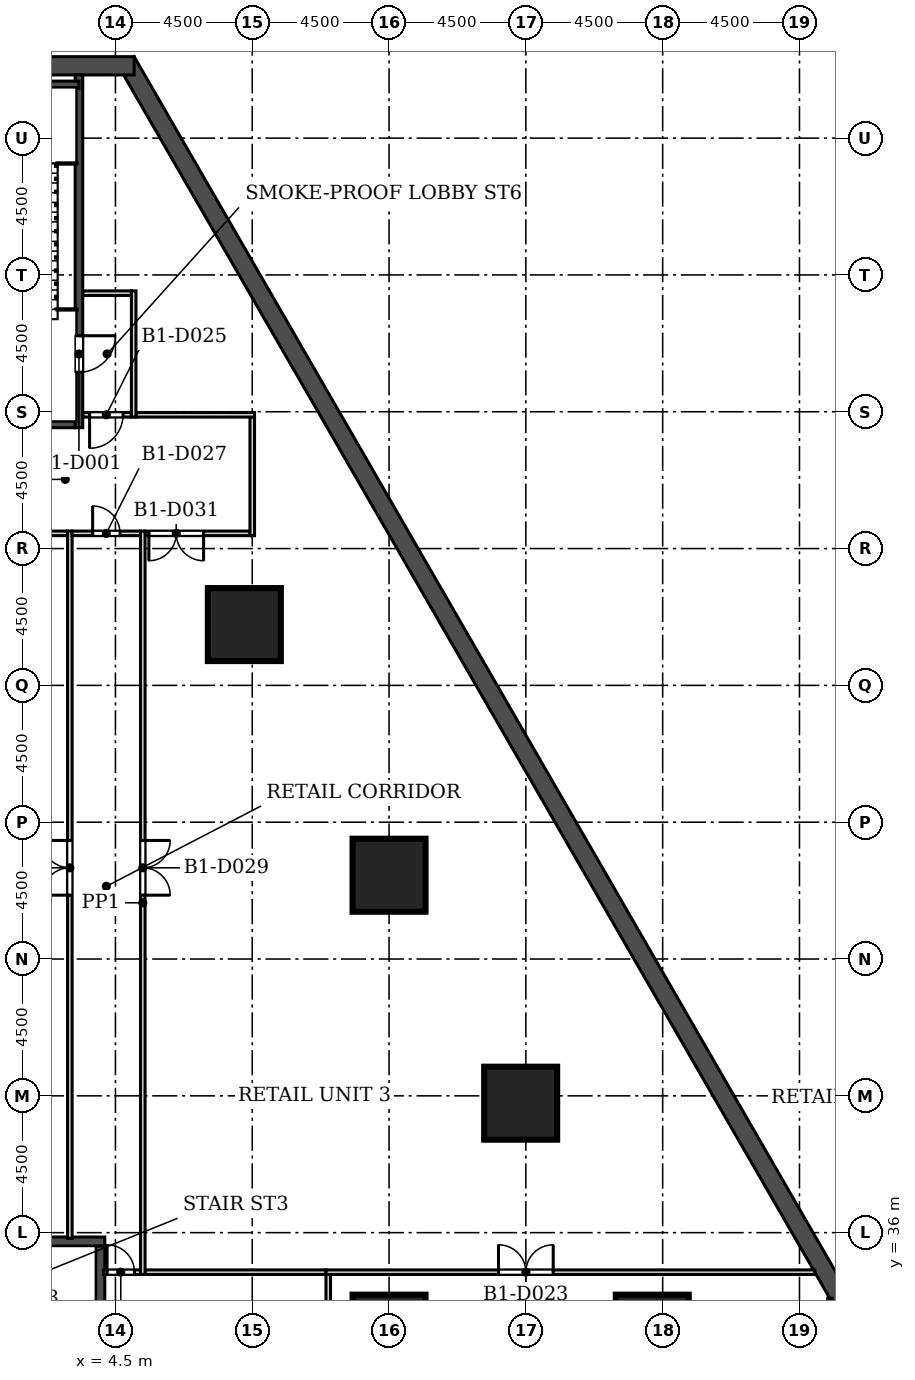
"""IFC4 building model, lengths in metres.
Left out: names, types, materials, properties, quantities, classifications, styles, units other than length and angle.
Written with IfcOpenShell. Run it as: python <this file> out.ifc"""

import sys

from ifc_helpers import new_model, si_unit, direction, frame, frame_2d, origin, origin_2d, place, context, subcontext, project, spatial, rectangle, extrude, element, fill, save


model = new_model("IFC4")
c1 = context("Model", 3, precision=1e-05, world=origin(), true_north=direction((0.0, 1.0)))
c2 = subcontext(c1, "Body", "Model", "MODEL_VIEW")
j1 = project(units=[si_unit("LENGTHUNIT", "METRE"), si_unit("PLANEANGLEUNIT", "RADIAN")], contexts=[c1])
p1 = place(None, origin())
s1 = spatial("IfcSite", under=j1, at=p1, CompositionType="ELEMENT")
p2 = place(p1, origin())
s2 = spatial("IfcBuilding", under=s1, at=p2, CompositionType="ELEMENT")
p3 = place(p2, frame((0.0, 0.0, -8.0)))
s3 = spatial("IfcBuildingStorey", under=s2, at=p3, CompositionType="ELEMENT", Elevation=-8.0)
p4 = place(p3, frame((42.971, 8.51, 0.0), z_axis=(0.0, 0.0, 1.0), x_axis=(-0.499999312333, 0.866025800809, 0.0)))
e1 = element("IfcWall", 1, at=p4, inside=s3, PredefinedType="SOLIDWALL", context=c2, shape_type="SweptSolid", body=[
    extrude(rectangle(XDim=76.231, YDim=0.6, at=frame_2d((38.115, 0.0))), origin(), (0.0, 0.0, 1.0), 7.6),
])
p5 = place(p3, frame((5.115, 74.378, 0.0), z_axis=(0.0, 0.0, 1.0), x_axis=(-1.0, 0.0, 0.0)))
e2 = element("IfcWall", 2, at=p5, inside=s3, PredefinedType="SOLIDWALL", context=c2, shape_type="SweptSolid", body=[
    extrude(rectangle(XDim=10.231, YDim=0.6, at=frame_2d((5.115, 0.0))), origin(), (0.0, 0.0, 1.0), 7.6),
])
for number, where, z_axis, x_axis in (
    (3, (8.74, 56.0, 0.0), (0.0, 0.0, 1.0), (1.0, 0.0, 0.0)),
    (4, (22.158, 32.76, 0.0), (0.0, 0.0, 1.0), (1.0, 0.0, 0.0)),
    (5, (13.5, 47.756, 0.0), (0.0, 0.0, 1.0), (1.0, 0.0, 0.0)),
    (6, (13.5, 32.76, 0.0), (0.0, 0.0, 1.0), (1.0, 0.0, 0.0)),
    (7, (17.829, 40.258, 0.0), (0.0, 0.0, 1.0), (1.0, 0.0, 0.0)),
):
    element("IfcColumn", number, at=place(p3, frame(where, z_axis=z_axis, x_axis=x_axis)), inside=s3, PredefinedType="COLUMN", context=c2, shape_type="SweptSolid", body=[
        extrude(rectangle(XDim=2.4, YDim=2.4, at=origin_2d()), origin(), (0.0, 0.0, 1.0), 8.0),
    ])
p6 = place(p3, frame((-4.15, 35.707, -0.35), z_axis=(0.0, 0.0, 1.0), x_axis=(1.0, 0.0, 0.0)))
e8 = element("IfcWall", 8, at=p6, inside=s3, PredefinedType="SOLIDWALL", context=c2, shape_type="SweptSolid", body=[
    extrude(rectangle(XDim=8.3, YDim=0.3, at=frame_2d((4.15, 0.0))), origin(), (0.0, 0.0, 1.0), 7.95),
])
p7 = place(p3, frame((4.0, 29.057, -0.35), z_axis=(0.0, 0.0, 1.0), x_axis=(0.0, 1.0, 0.0)))
e9 = element("IfcWall", 9, at=p7, inside=s3, PredefinedType="SOLIDWALL", context=c2, shape_type="SweptSolid", body=[
    extrude(rectangle(XDim=6.5, YDim=0.3, at=frame_2d((3.25, 0.0))), origin(), (0.0, 0.0, 1.0), 7.95),
])
p8 = place(p3, frame((28.0, 29.525, 0.0), z_axis=(0.0, 0.0, 1.0), x_axis=(0.0, 1.0, 0.0)))
e10 = element("IfcWall", 10, at=p8, inside=s3, PredefinedType="PARTITIONING", context=c2, shape_type="SweptSolid", body=[
    extrude(rectangle(XDim=4.316, YDim=0.15, at=frame_2d((2.158, 0.0))), origin(), (0.0, 0.0, 1.0), 7.6),
])
p9 = place(p3, frame((11.5, 34.625, 0.0), z_axis=(0.0, 0.0, 1.0), x_axis=(0.0, -1.0, 0.0)))
e11 = element("IfcWall", 11, at=p9, inside=s3, PredefinedType="PARTITIONING", context=c2, shape_type="SweptSolid", body=[
    extrude(rectangle(XDim=8.7, YDim=0.15, at=frame_2d((4.35, 0.0))), origin(), (0.0, 0.0, 1.0), 7.6),
])
p10 = place(p9, frame((5.125, 0.0, 0.0)))
e12 = element("IfcOpeningElement", 12, at=p10, cuts=e11, PredefinedType="OPENING", context=c2, shape_type="SweptSolid", body=[
    extrude(rectangle(XDim=3.0, YDim=2.4, at=frame_2d((1.5, 1.2))), frame((0.0, 0.085, 0.0), z_axis=(0.0, -1.0, 0.0), x_axis=(1.0, 0.0, 0.0)), (0.0, 0.0, 1.0), 0.17),
])
p11 = place(p3, frame((5.325, 34.7, 0.0), z_axis=(0.0, 0.0, 1.0), x_axis=(-1.0, 0.0, 0.0)))
e13 = element("IfcWall", 13, at=p11, inside=s3, PredefinedType="PARTITIONING", context=c2, shape_type="SweptSolid", body=[
    extrude(rectangle(XDim=1.22, YDim=0.15, at=frame_2d((0.61, 0.0))), origin(), (0.0, 0.0, 1.0), 7.6),
])
p12 = place(p11, frame((0.2, 0.0, 0.0)))
e14 = element("IfcOpeningElement", 14, at=p12, cuts=e13, PredefinedType="OPENING", context=c2, shape_type="SweptSolid", body=[
    extrude(rectangle(XDim=0.9, YDim=2.1, at=frame_2d((0.45, 1.05))), frame((0.0, 0.085, 0.0), z_axis=(0.0, -1.0, 0.0), x_axis=(1.0, 0.0, 0.0)), (0.0, 0.0, 1.0), 0.17),
])
p13 = place(p3, frame((11.425, 34.7, 0.0), z_axis=(0.0, 0.0, 1.0), x_axis=(-1.0, 0.0, 0.0)))
e15 = element("IfcWall", 15, at=p13, inside=s3, PredefinedType="PARTITIONING", context=c2, shape_type="SweptSolid", body=[
    extrude(rectangle(XDim=5.95, YDim=0.15, at=frame_2d((2.975, 0.0))), origin(), (0.0, 0.0, 1.0), 7.6),
])
p14 = place(p3, frame((27.504, 34.7, 0.0), z_axis=(0.0, 0.0, 1.0), x_axis=(-1.0, 0.0, 0.0)))
e16 = element("IfcWall", 16, at=p14, inside=s3, PredefinedType="PARTITIONING", context=c2, shape_type="SweptSolid", body=[
    extrude(rectangle(XDim=16.079, YDim=0.15, at=frame_2d((8.04, 0.0))), origin(), (0.0, 0.0, 1.0), 7.6),
])
p15 = place(p14, frame((8.604, 0.0, 0.0)))
e17 = element("IfcOpeningElement", 17, at=p15, cuts=e16, PredefinedType="OPENING", context=c2, shape_type="SweptSolid", body=[
    extrude(rectangle(XDim=1.8, YDim=2.1, at=frame_2d((0.9, 1.05))), frame((0.0, 0.085, 0.0), z_axis=(0.0, -1.0, 0.0), x_axis=(1.0, 0.0, 0.0)), (0.0, 0.0, 1.0), 0.17),
])
p16 = place(p3, frame((3.0, 35.812, 0.0), z_axis=(0.0, 0.0, 1.0), x_axis=(0.0, 1.0, 0.0)))
e18 = element("IfcWall", 18, at=p16, inside=s3, PredefinedType="PARTITIONING", context=c2, shape_type="SweptSolid", body=[
    extrude(rectangle(XDim=23.263, YDim=0.15, at=frame_2d((11.631, 0.0))), origin(), (0.0, 0.0, 1.0), 7.6),
])
p17 = place(p16, frame((11.288, 0.0, 0.0)))
e19 = element("IfcOpeningElement", 19, at=p17, cuts=e18, PredefinedType="OPENING", context=c2, shape_type="SweptSolid", body=[
    extrude(rectangle(XDim=1.8, YDim=2.1, at=frame_2d((0.9, 1.05))), frame((0.0, 0.085, 0.0), z_axis=(0.0, -1.0, 0.0), x_axis=(1.0, 0.0, 0.0)), (0.0, 0.0, 1.0), 0.17),
])
p18 = place(p3, frame((2.925, 59.0, 0.0), z_axis=(0.0, 0.0, 1.0), x_axis=(-1.0, 0.0, 0.0)))
e20 = element("IfcWall", 20, at=p18, inside=s3, PredefinedType="PARTITIONING", context=c2, shape_type="SweptSolid", body=[
    extrude(rectangle(XDim=6.3, YDim=0.15, at=frame_2d((3.15, 0.0))), origin(), (0.0, 0.0, 1.0), 7.6),
])
p19 = place(p18, frame((3.625, 0.0, 0.0)))
e21 = element("IfcOpeningElement", 21, at=p19, cuts=e20, PredefinedType="OPENING", context=c2, shape_type="SweptSolid", body=[
    extrude(rectangle(XDim=1.8, YDim=2.1, at=frame_2d((0.9, 1.05))), frame((0.0, 0.085, 0.0), z_axis=(0.0, -1.0, 0.0), x_axis=(1.0, 0.0, 0.0)), (0.0, 0.0, 1.0), 0.17),
])
p20 = place(p3, frame((5.325, 59.0, 0.0), z_axis=(0.0, 0.0, 1.0), x_axis=(-1.0, 0.0, 0.0)))
e22 = element("IfcWall", 22, at=p20, inside=s3, PredefinedType="PARTITIONING", context=c2, shape_type="SweptSolid", body=[
    extrude(rectangle(XDim=2.25, YDim=0.15, at=frame_2d((1.125, 0.0))), origin(), (0.0, 0.0, 1.0), 7.6),
])
p21 = place(p20, frame((0.675, 0.0, 0.0)))
e23 = element("IfcOpeningElement", 23, at=p21, cuts=e22, PredefinedType="OPENING", context=c2, shape_type="SweptSolid", body=[
    extrude(rectangle(XDim=0.9, YDim=2.1, at=frame_2d((0.45, 1.05))), frame((0.0, 0.085, 0.0), z_axis=(0.0, -1.0, 0.0), x_axis=(1.0, 0.0, 0.0)), (0.0, 0.0, 1.0), 0.17),
])
p22 = place(p3, frame((8.925, 59.0, 0.0), z_axis=(0.0, 0.0, 1.0), x_axis=(-1.0, 0.0, 0.0)))
e24 = element("IfcWall", 24, at=p22, inside=s3, PredefinedType="PARTITIONING", context=c2, shape_type="SweptSolid", body=[
    extrude(rectangle(XDim=3.45, YDim=0.15, at=frame_2d((1.725, 0.0))), origin(), (0.0, 0.0, 1.0), 7.6),
])
p23 = place(p22, frame((1.525, 0.0, 0.0)))
e25 = element("IfcOpeningElement", 25, at=p23, cuts=e24, PredefinedType="OPENING", context=c2, shape_type="SweptSolid", body=[
    extrude(rectangle(XDim=1.8, YDim=2.1, at=frame_2d((0.9, 1.05))), frame((0.0, 0.085, 0.0), z_axis=(0.0, -1.0, 0.0), x_axis=(1.0, 0.0, 0.0)), (0.0, 0.0, 1.0), 0.17),
])
p24 = place(p3, frame((5.4, 59.075, 0.0), z_axis=(0.0, 0.0, 1.0), x_axis=(0.0, -1.0, 0.0)))
e26 = element("IfcWall", 26, at=p24, inside=s3, PredefinedType="PARTITIONING", context=c2, shape_type="SweptSolid", body=[
    extrude(rectangle(XDim=24.45, YDim=0.15, at=frame_2d((12.225, 0.0))), origin(), (0.0, 0.0, 1.0), 7.6),
])
p25 = place(p24, frame((10.175, 0.0, 0.0)))
e27 = element("IfcOpeningElement", 27, at=p25, cuts=e26, PredefinedType="OPENING", context=c2, shape_type="SweptSolid", body=[
    extrude(rectangle(XDim=1.8, YDim=2.1, at=frame_2d((0.9, 1.05))), frame((0.0, 0.085, 0.0), z_axis=(0.0, -1.0, 0.0), x_axis=(1.0, 0.0, 0.0)), (0.0, 0.0, 1.0), 0.17),
])
p26 = place(p3, frame((3.175, 62.6, 0.0), z_axis=(0.0, 0.0, 1.0), x_axis=(-1.0, 0.0, 0.0)))
e28 = element("IfcWall", 28, at=p26, inside=s3, PredefinedType="SOLIDWALL", context=c2, shape_type="SweptSolid", body=[
    extrude(rectangle(XDim=6.35, YDim=0.25, at=frame_2d((3.175, 0.0))), origin(), (0.0, 0.0, 1.0), 7.6),
])
p27 = place(p3, frame((9.0, 62.825, 0.0), z_axis=(0.0, 0.0, 1.0), x_axis=(0.0, -1.0, 0.0)))
e29 = element("IfcWall", 29, at=p27, inside=s3, PredefinedType="PARTITIONING", context=c2, shape_type="SweptSolid", body=[
    extrude(rectangle(XDim=3.9, YDim=0.15, at=frame_2d((1.95, 0.0))), origin(), (0.0, 0.0, 1.0), 7.6),
])
p28 = place(p3, frame((5.025, 62.9, 0.0), z_axis=(0.0, 0.0, 1.0), x_axis=(-1.0, 0.0, 0.0)))
e30 = element("IfcWall", 30, at=p28, inside=s3, PredefinedType="PARTITIONING", context=c2, shape_type="SweptSolid", body=[
    extrude(rectangle(XDim=1.6, YDim=0.15, at=frame_2d((0.8, 0.0))), origin(), (0.0, 0.0, 1.0), 7.6),
])
p29 = place(p28, frame((0.275, 0.0, 0.0)))
e31 = element("IfcOpeningElement", 31, at=p29, cuts=e30, PredefinedType="OPENING", context=c2, shape_type="SweptSolid", body=[
    extrude(rectangle(XDim=1.1, YDim=2.1, at=frame_2d((0.55, 1.05))), frame((0.0, 0.085, 0.0), z_axis=(0.0, -1.0, 0.0), x_axis=(1.0, 0.0, 0.0)), (0.0, 0.0, 1.0), 0.17),
])
p30 = place(p3, frame((5.175, 62.9, 0.0), z_axis=(0.0, 0.0, 1.0), x_axis=(1.0, 0.0, 0.0)))
e32 = element("IfcWall", 32, at=p30, inside=s3, PredefinedType="PARTITIONING", context=c2, shape_type="SweptSolid", body=[
    extrude(rectangle(XDim=3.9, YDim=0.15, at=frame_2d((1.95, 0.0))), origin(), (0.0, 0.0, 1.0), 7.6),
])
p31 = place(p3, frame((3.425, 66.9, 0.0), z_axis=(0.0, 0.0, 1.0), x_axis=(1.0, 0.0, 0.0)))
e33 = element("IfcWall", 33, at=p31, inside=s3, PredefinedType="PARTITIONING", context=c2, shape_type="SweptSolid", body=[
    extrude(rectangle(XDim=1.6, YDim=0.15, at=frame_2d((0.8, 0.0))), origin(), (0.0, 0.0, 1.0), 7.6),
])
p32 = place(p3, frame((5.1, 66.975, 0.0), z_axis=(0.0, 0.0, 1.0), x_axis=(0.0, -1.0, 0.0)))
e34 = element("IfcWall", 34, at=p32, inside=s3, PredefinedType="PARTITIONING", context=c2, shape_type="SweptSolid", body=[
    extrude(rectangle(XDim=4.15, YDim=0.15, at=frame_2d((2.075, 0.0))), origin(), (0.0, 0.0, 1.0), 7.6),
])
p33 = place(p3, frame((3.3, 74.078, 0.0), z_axis=(0.0, 0.0, 1.0), x_axis=(0.0, -1.0, 0.0)))
e35 = element("IfcWall", 35, at=p33, inside=s3, PredefinedType="SOLIDWALL", context=c2, shape_type="SweptSolid", body=[
    extrude(rectangle(XDim=11.603, YDim=0.25, at=frame_2d((5.802, 0.0))), origin(), (0.0, 0.0, 1.0), 7.6),
])
p34 = place(p33, frame((8.578, 0.0, 0.0)))
e36 = element("IfcOpeningElement", 36, at=p34, cuts=e35, PredefinedType="OPENING", context=c2, shape_type="SweptSolid", body=[
    extrude(rectangle(XDim=1.2, YDim=2.1, at=frame_2d((0.6, 1.05))), frame((0.0, 0.135, 0.0), z_axis=(0.0, -1.0, 0.0), x_axis=(1.0, 0.0, 0.0)), (0.0, 0.0, 1.0), 0.27),
])
p35 = place(p3, frame((-3.3, 73.75, 0.0), z_axis=(0.0, 0.0, 1.0), x_axis=(1.0, 0.0, 0.0)))
e37 = element("IfcWall", 37, at=p35, inside=s3, PredefinedType="SOLIDWALL", context=c2, shape_type="SweptSolid", body=[
    extrude(rectangle(XDim=6.6, YDim=0.25, at=frame_2d((3.3, 0.0))), origin(), (0.0, 0.0, 1.0), 7.6),
])
p36 = place(p34, origin())
e38 = element("IfcDoor", 38, at=p36, inside=s3, OperationType="SINGLE_SWING_LEFT", PredefinedType="DOOR", context=c2, shape_type="SweptSolid", body=[
    extrude(rectangle(XDim=1.2, YDim=2.1, at=frame_2d((0.6, 1.05))), frame((0.0, 0.025, 0.0), z_axis=(0.0, -1.0, 0.0), x_axis=(1.0, 0.0, 0.0)), (0.0, 0.0, 1.0), 0.05),
])
fill(e36, e38)
p37 = place(p15, frame((1.8, 0.0, 0.0), z_axis=(0.0, 0.0, 1.0), x_axis=(-1.0, 0.0, 0.0)))
e39 = element("IfcDoor", 39, at=p37, inside=s3, OperationType="DOUBLE_DOOR_SINGLE_SWING", PredefinedType="DOOR", context=c2, shape_type="SweptSolid", body=[
    extrude(rectangle(XDim=1.8, YDim=2.1, at=frame_2d((0.9, 1.05))), frame((0.0, 0.025, 0.0), z_axis=(0.0, -1.0, 0.0), x_axis=(1.0, 0.0, 0.0)), (0.0, 0.0, 1.0), 0.05),
])
fill(e17, e39)
p38 = place(p29, origin())
e40 = element("IfcDoor", 40, at=p38, inside=s3, OperationType="SINGLE_SWING_RIGHT", PredefinedType="DOOR", context=c2, shape_type="SweptSolid", body=[
    extrude(rectangle(XDim=1.1, YDim=2.1, at=frame_2d((0.55, 1.05))), frame((0.0, 0.025, 0.0), z_axis=(0.0, -1.0, 0.0), x_axis=(1.0, 0.0, 0.0)), (0.0, 0.0, 1.0), 0.05),
])
fill(e31, e40)
p39 = place(p12, frame((0.9, 0.0, 0.0), z_axis=(0.0, 0.0, 1.0), x_axis=(-1.0, 0.0, 0.0)))
e41 = element("IfcDoor", 41, at=p39, inside=s3, OperationType="SINGLE_SWING_LEFT", PredefinedType="DOOR", context=c2, shape_type="SweptSolid", body=[
    extrude(rectangle(XDim=0.9, YDim=2.1, at=frame_2d((0.45, 1.05))), frame((0.0, 0.025, 0.0), z_axis=(0.0, -1.0, 0.0), x_axis=(1.0, 0.0, 0.0)), (0.0, 0.0, 1.0), 0.05),
])
fill(e14, e41)
p40 = place(p21, frame((0.9, 0.0, 0.0), z_axis=(0.0, 0.0, 1.0), x_axis=(-1.0, 0.0, 0.0)))
e42 = element("IfcDoor", 42, at=p40, inside=s3, OperationType="SINGLE_SWING_LEFT", PredefinedType="DOOR", context=c2, shape_type="SweptSolid", body=[
    extrude(rectangle(XDim=0.9, YDim=2.1, at=frame_2d((0.45, 1.05))), frame((0.0, 0.025, 0.0), z_axis=(0.0, -1.0, 0.0), x_axis=(1.0, 0.0, 0.0)), (0.0, 0.0, 1.0), 0.05),
])
fill(e23, e42)
p41 = place(p17, origin())
e43 = element("IfcDoor", 43, at=p41, inside=s3, OperationType="DOUBLE_DOOR_SINGLE_SWING", PredefinedType="DOOR", context=c2, shape_type="SweptSolid", body=[
    extrude(rectangle(XDim=1.8, YDim=2.1, at=frame_2d((0.9, 1.05))), frame((0.0, 0.025, 0.0), z_axis=(0.0, -1.0, 0.0), x_axis=(1.0, 0.0, 0.0)), (0.0, 0.0, 1.0), 0.05),
])
fill(e19, e43)
p42 = place(p25, origin())
e44 = element("IfcDoor", 44, at=p42, inside=s3, OperationType="DOUBLE_DOOR_SINGLE_SWING", PredefinedType="DOOR", context=c2, shape_type="SweptSolid", body=[
    extrude(rectangle(XDim=1.8, YDim=2.1, at=frame_2d((0.9, 1.05))), frame((0.0, 0.025, 0.0), z_axis=(0.0, -1.0, 0.0), x_axis=(1.0, 0.0, 0.0)), (0.0, 0.0, 1.0), 0.05),
])
fill(e27, e44)
p43 = place(p23, origin())
e45 = element("IfcDoor", 45, at=p43, inside=s3, OperationType="DOUBLE_DOOR_SINGLE_SWING", PredefinedType="DOOR", context=c2, shape_type="SweptSolid", body=[
    extrude(rectangle(XDim=1.8, YDim=2.1, at=frame_2d((0.9, 1.05))), frame((0.0, 0.025, 0.0), z_axis=(0.0, -1.0, 0.0), x_axis=(1.0, 0.0, 0.0)), (0.0, 0.0, 1.0), 0.05),
])
fill(e25, e45)
save(model, sys.argv[1])
